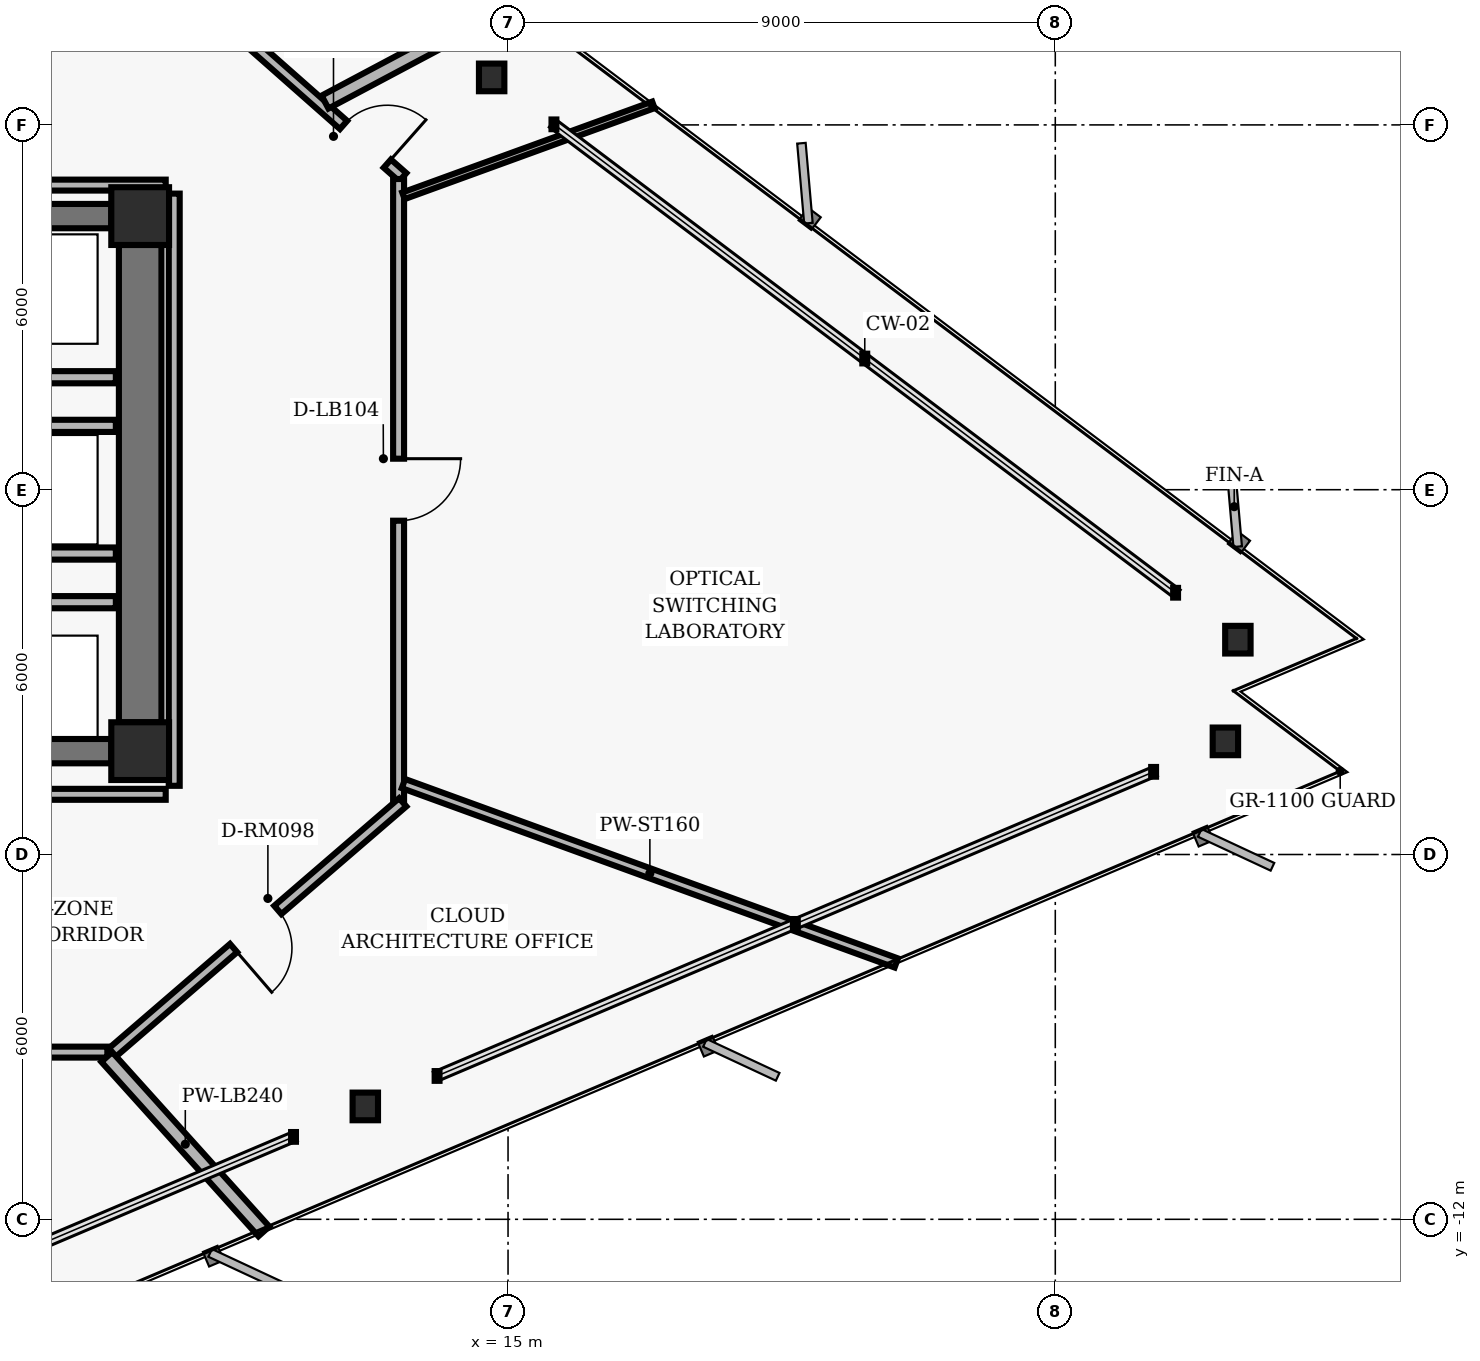
"""IFC4 building model, lengths in metres.
Left out: names, types, materials, properties, quantities, classifications, styles, units other than length and angle.
Written with IfcOpenShell. Run it as: python <this file> out.ifc"""

import sys

from ifc_helpers import new_model, si_unit, direction, frame, frame_2d, origin, origin_2d, place, context, subcontext, project, spatial, rectangle, hollow_rectangle, i_section, extrude, element, fill, save


model = new_model("IFC4")
c1 = context("Model", 3, precision=1e-05, world=origin(), true_north=direction((0.0, 1.0)))
c2 = subcontext(c1, "Body", "Model", "MODEL_VIEW")
j1 = project(units=[si_unit("LENGTHUNIT", "METRE"), si_unit("PLANEANGLEUNIT", "RADIAN")], contexts=[c1])
p1 = place(None, origin())
s1 = spatial("IfcSite", under=j1, at=p1, CompositionType="ELEMENT")
p2 = place(p1, origin())
s2 = spatial("IfcBuilding", under=s1, at=p2, CompositionType="ELEMENT")
p3 = place(p2, frame((0.0, 0.0, 69.76)))
s3 = spatial("IfcBuildingStorey", under=s2, at=p3, CompositionType="ELEMENT", Elevation=69.76)
for number, where, z_axis, x_axis in (
    (1, (8.95, 4.5, 0.0), (0.0, 0.0, 1.0), (1.0, 0.0, 0.0)),
    (2, (8.95, -4.3, 0.0), (0.0, 0.0, 1.0), (1.0, 0.0, 0.0)),
):
    element("IfcColumn", number, at=place(p3, frame(where, z_axis=z_axis, x_axis=x_axis)), inside=s3, PredefinedType="COLUMN", context=c2, shape_type="SweptSolid", body=[
        extrude(hollow_rectangle(XDim=0.95, YDim=0.95, WallThickness=0.06, InnerFilletRadius=0.02, OuterFilletRadius=0.04, at=origin_2d()), origin(), (0.0, 0.0, 1.0), 3.36),
    ])
p4 = place(p3, frame((8.95, -3.825, 0.0), z_axis=(0.0, 0.0, 1.0), x_axis=(0.0, 1.0, 0.0)))
e3 = element("IfcWall", 3, at=p4, inside=s3, PredefinedType="SHEAR", context=c2, shape_type="SweptSolid", body=[
    extrude(rectangle(XDim=7.85, YDim=0.7, at=frame_2d((3.925, 0.0))), origin(), (0.0, 0.0, 1.0), 3.098),
])
for number, where, z_axis, x_axis in (
    (4, (6.525, 4.5, 0.0), (0.0, 0.0, 1.0), (1.0, 0.0, 0.0)),
    (5, (6.525, -4.3, 0.0), (0.0, 0.0, 1.0), (1.0, 0.0, 0.0)),
):
    element("IfcWall", number, at=place(p3, frame(where, z_axis=z_axis, x_axis=x_axis)), inside=s3, PredefinedType="SHEAR", context=c2, shape_type="SweptSolid", body=[
        extrude(rectangle(XDim=1.95, YDim=0.4, at=frame_2d((0.975, 0.0))), origin(), (0.0, 0.0, 1.0), 3.098),
    ])
for number, where, z_axis, x_axis in (
    (6, (27.003, -2.467, 0.0), (0.0, 0.0, 1.0), (1.0, 0.0, 0.0)),
    (7, (14.73, 6.781, 0.0), (0.0, 0.0, 1.0), (1.0, 0.0, 0.0)),
    (8, (12.653, -10.143, 0.0), (0.0, 0.0, 1.0), (1.0, 0.0, 0.0)),
    (9, (26.798, -4.139, 0.0), (0.0, 0.0, 1.0), (1.0, 0.0, 0.0)),
):
    element("IfcColumn", number, at=place(p3, frame(where, z_axis=z_axis, x_axis=x_axis)), inside=s3, PredefinedType="COLUMN", context=c2, shape_type="SweptSolid", body=[
        extrude(i_section(OverallWidth=0.418, OverallDepth=0.455, WebThickness=0.042, FlangeThickness=0.068, FilletRadius=0.025, at=origin_2d()), origin(), (0.0, 0.0, 1.0), 3.36),
    ])
for number, where, z_axis, x_axis in (
    (10, (6.45, -1.85, 0.0), (0.0, 0.0, 1.0), (1.0, 0.0, 0.0)),
    (11, (6.45, 1.85, 0.0), (0.0, 0.0, 1.0), (1.0, 0.0, 0.0)),
):
    element("IfcWall", number, at=place(p3, frame(where, z_axis=z_axis, x_axis=x_axis)), inside=s3, PredefinedType="PARTITIONING", context=c2, shape_type="SweptSolid", body=[
        extrude(rectangle(XDim=2.1, YDim=0.2, at=frame_2d((1.05, 0.0))), origin(), (0.0, 0.0, 1.0), 3.073),
    ])
for number, where, z_axis, x_axis in (
    (12, (6.64, -1.05, 0.0), (0.0, 0.0, 1.0), (1.0, 0.0, 0.0)),
    (13, (6.64, 1.05, 0.0), (0.0, 0.0, 1.0), (1.0, 0.0, 0.0)),
):
    element("IfcWall", number, at=place(p3, frame(where, z_axis=z_axis, x_axis=x_axis)), inside=s3, PredefinedType="PARTITIONING", context=c2, shape_type="SweptSolid", body=[
        extrude(rectangle(XDim=1.91, YDim=0.2, at=frame_2d((0.955, 0.0))), origin(), (0.0, 0.0, 1.0), 3.073),
    ])
p5 = place(p3, frame((8.567, 9.29, 0.0), z_axis=(0.0, 0.0, 1.0), x_axis=(0.749626463267, -0.66186113768, 0.0)))
e14 = element("IfcWall", 14, at=p5, inside=s3, PredefinedType="PARTITIONING", context=c2, shape_type="SweptSolid", body=[
    extrude(rectangle(XDim=6.27, YDim=0.18, at=frame_2d((3.135, 0.0))), origin(), (0.0, 0.0, 1.0), 2.587),
])
p6 = place(p5, frame((4.972, 0.0, 0.0)))
e15 = element("IfcOpeningElement", 15, at=p6, cuts=e14, PredefinedType="OPENING", context=c2, shape_type="SweptSolid", body=[
    extrude(rectangle(XDim=0.96, YDim=2.02, at=frame_2d((0.48, 1.01))), frame((0.0, 0.1, 0.0), z_axis=(0.0, -1.0, 0.0), x_axis=(1.0, 0.0, 0.0)), (0.0, 0.0, 1.0), 0.2),
])
p7 = place(p3, frame((13.2, 5.11, 0.0), z_axis=(0.0, 0.0, 1.0), x_axis=(0.0, -1.0, 0.0)))
e16 = element("IfcWall", 16, at=p7, inside=s3, PredefinedType="PARTITIONING", context=c2, shape_type="SweptSolid", body=[
    extrude(rectangle(XDim=10.22, YDim=0.18, at=frame_2d((5.11, 0.0))), origin(), (0.0, 0.0, 1.0), 3.073),
])
p8 = place(p7, frame((4.6, 0.0, 0.0)))
e17 = element("IfcOpeningElement", 17, at=p8, cuts=e16, PredefinedType="OPENING", context=c2, shape_type="SweptSolid", body=[
    extrude(rectangle(XDim=1.02, YDim=2.02, at=frame_2d((0.51, 1.01))), frame((0.0, 0.1, 0.0), z_axis=(0.0, -1.0, 0.0), x_axis=(1.0, 0.0, 0.0)), (0.0, 0.0, 1.0), 0.2),
])
p9 = place(p3, frame((13.268, -5.141, 0.0), z_axis=(0.0, 0.0, 1.0), x_axis=(-0.757534501725, -0.65279512766, 0.0)))
e18 = element("IfcWall", 18, at=p9, inside=s3, PredefinedType="PARTITIONING", context=c2, shape_type="SweptSolid", body=[
    extrude(rectangle(XDim=6.385, YDim=0.18, at=frame_2d((3.192, 0.0))), origin(), (0.0, 0.0, 1.0), 3.073),
])
p10 = place(p9, frame((2.712, 0.0, 0.0)))
e19 = element("IfcOpeningElement", 19, at=p10, cuts=e18, PredefinedType="OPENING", context=c2, shape_type="SweptSolid", body=[
    extrude(rectangle(XDim=0.96, YDim=2.02, at=frame_2d((0.48, 1.01))), frame((0.0, 0.1, 0.0), z_axis=(0.0, -1.0, 0.0), x_axis=(1.0, 0.0, 0.0)), (0.0, 0.0, 1.0), 0.2),
])
p11 = place(p3, frame((8.41, -9.25, 0.0), z_axis=(0.0, 0.0, 1.0), x_axis=(-1.0, 0.0, 0.0)))
e20 = element("IfcWall", 20, at=p11, inside=s3, PredefinedType="PARTITIONING", context=c2, shape_type="SweptSolid", body=[
    extrude(rectangle(XDim=17.0, YDim=0.18, at=frame_2d((8.5, 0.0))), origin(), (0.0, 0.0, 1.0), 2.587),
])
p12 = place(p11, frame((7.252, 0.0, 0.0)))
e21 = element("IfcOpeningElement", 21, at=p12, cuts=e20, PredefinedType="OPENING", context=c2, shape_type="SweptSolid", body=[
    extrude(rectangle(XDim=0.96, YDim=2.02, at=frame_2d((0.48, 1.01))), frame((0.0, 0.1, 0.0), z_axis=(0.0, -1.0, 0.0), x_axis=(1.0, 0.0, 0.0)), (0.0, 0.0, 1.0), 0.2),
])
p13 = place(p3, frame((6.03, -5.01, 0.0), z_axis=(0.0, 0.0, 1.0), x_axis=(1.0, 0.0, 0.0)))
e22 = element("IfcWall", 22, at=p13, inside=s3, PredefinedType="PARTITIONING", context=c2, shape_type="SweptSolid", body=[
    extrude(rectangle(XDim=3.34, YDim=0.18, at=frame_2d((1.67, 0.0))), origin(), (0.0, 0.0, 1.0), 3.073),
])
p14 = place(p3, frame((9.51, -4.87, 0.0), z_axis=(0.0, 0.0, 1.0), x_axis=(0.0, 1.0, 0.0)))
e23 = element("IfcWall", 23, at=p14, inside=s3, PredefinedType="PARTITIONING", context=c2, shape_type="SweptSolid", body=[
    extrude(rectangle(XDim=9.74, YDim=0.18, at=frame_2d((4.87, 0.0))), origin(), (0.0, 0.0, 1.0), 3.073),
])
p15 = place(p3, frame((9.37, 5.01, 0.0), z_axis=(0.0, 0.0, 1.0), x_axis=(-1.0, 0.0, 0.0)))
e24 = element("IfcWall", 24, at=p15, inside=s3, PredefinedType="PARTITIONING", context=c2, shape_type="SweptSolid", body=[
    extrude(rectangle(XDim=2.808, YDim=0.18, at=frame_2d((1.404, 0.0))), origin(), (0.0, 0.0, 1.0), 3.073),
])
p16 = place(p3, frame((8.401, -9.33, 0.0), z_axis=(0.0, 0.0, 1.0), x_axis=(0.669139425, -0.743136885043, 0.0)))
e25 = element("IfcWall", 25, at=p16, inside=s3, PredefinedType="PARTITIONING", context=c2, shape_type="SweptSolid", body=[
    extrude(rectangle(XDim=3.86, YDim=0.24, at=frame_2d((1.93, 0.0))), origin(), (0.0, 0.0, 1.0), 3.073),
])
p17 = place(p3, frame((13.28, -4.833, 0.0), z_axis=(0.0, 0.0, 1.0), x_axis=(0.939687597414, -0.342033944611, 0.0)))
e26 = element("IfcWall", 26, at=p17, inside=s3, PredefinedType="PARTITIONING", context=c2, shape_type="SweptSolid", body=[
    extrude(rectangle(XDim=8.625, YDim=0.16, at=frame_2d((4.313, 0.0))), origin(), (0.0, 0.0, 1.0), 3.073),
])
p18 = place(p3, frame((13.28, 4.833, 0.0), z_axis=(0.0, 0.0, 1.0), x_axis=(0.939689084441, 0.342029859198, 0.0)))
e27 = element("IfcWall", 27, at=p18, inside=s3, PredefinedType="MOVABLE", context=c2, shape_type="SweptSolid", body=[
    extrude(rectangle(XDim=4.374, YDim=0.115, at=frame_2d((2.187, 0.0))), origin(), (0.0, 0.0, 1.0), 3.073),
])
p19 = place(p3, frame((11.99, 6.375, 0.0), z_axis=(0.0, 0.0, 1.0), x_axis=(0.882950733712, 0.469465655654, 0.0)))
e28 = element("IfcWall", 28, at=p19, inside=s3, PredefinedType="PARTITIONING", context=c2, shape_type="SweptSolid", body=[
    extrude(rectangle(XDim=3.546, YDim=0.24, at=frame_2d((1.773, 0.0))), origin(), (0.0, 0.0, 1.0), 3.073),
])
p20 = place(p10, origin())
e29 = element("IfcDoor", 29, at=p20, inside=s3, OperationType="SINGLE_SWING_RIGHT", PredefinedType="DOOR", context=c2, shape_type="SweptSolid", body=[
    extrude(rectangle(XDim=0.96, YDim=2.02, at=frame_2d((0.48, 1.01))), frame((0.0, 0.025, 0.0), z_axis=(0.0, -1.0, 0.0), x_axis=(1.0, 0.0, 0.0)), (0.0, 0.0, 1.0), 0.05),
])
fill(e19, e29)
p21 = place(p8, origin())
e30 = element("IfcDoor", 30, at=p21, inside=s3, OperationType="SINGLE_SWING_LEFT", PredefinedType="DOOR", context=c2, shape_type="SweptSolid", body=[
    extrude(rectangle(XDim=1.02, YDim=2.02, at=frame_2d((0.51, 1.01))), frame((0.0, 0.025, 0.0), z_axis=(0.0, -1.0, 0.0), x_axis=(1.0, 0.0, 0.0)), (0.0, 0.0, 1.0), 0.05),
])
fill(e17, e30)
p22 = place(p6, origin())
e31 = element("IfcDoor", 31, at=p22, inside=s3, OperationType="SINGLE_SWING_RIGHT", PredefinedType="DOOR", context=c2, shape_type="SweptSolid", body=[
    extrude(rectangle(XDim=0.96, YDim=2.02, at=frame_2d((0.48, 1.01))), frame((0.0, 0.025, 0.0), z_axis=(0.0, -1.0, 0.0), x_axis=(1.0, 0.0, 0.0)), (0.0, 0.0, 1.0), 0.05),
])
fill(e15, e31)
save(model, sys.argv[1])
